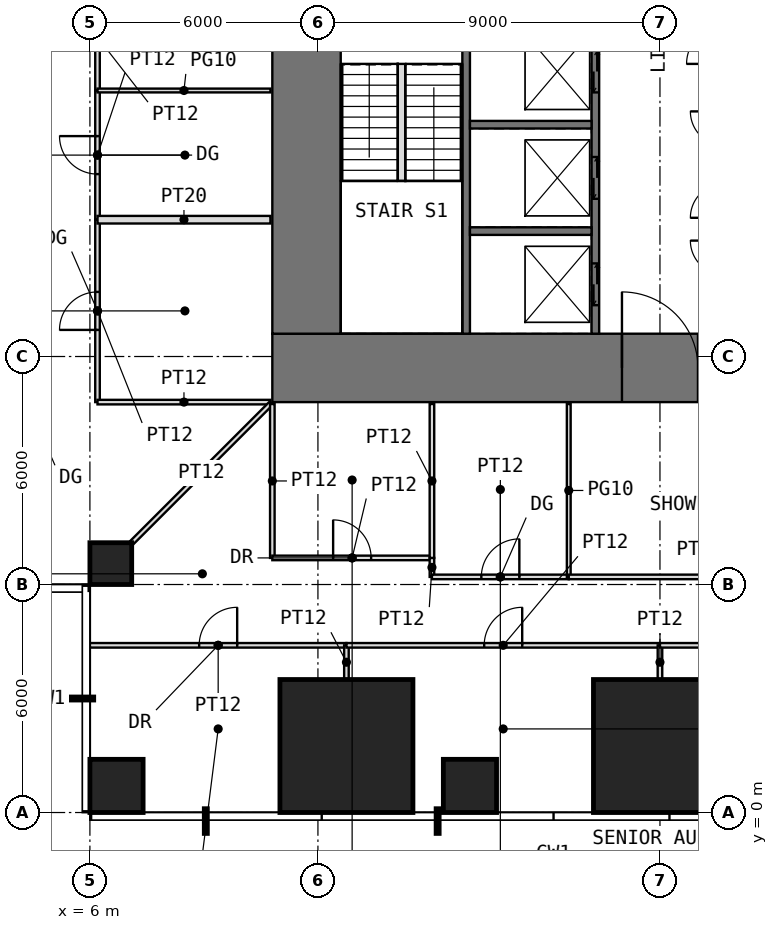
"""IFC4 building model, lengths in metres.
Left out: names, types, materials, properties, quantities, classifications, styles, units other than length and angle.
Written with IfcOpenShell. Run it as: python <this file> out.ifc"""

import sys

from ifc_helpers import new_model, si_unit, direction, frame, frame_2d, origin, origin_2d, place, context, subcontext, project, spatial, rectangle, extrude, element, fill, save


model = new_model("IFC4")
c1 = context("Model", 3, precision=1e-05, world=origin(), true_north=direction((0.0, 1.0)))
c2 = subcontext(c1, "Body", "Model", "MODEL_VIEW")
j1 = project(units=[si_unit("LENGTHUNIT", "METRE"), si_unit("PLANEANGLEUNIT", "RADIAN")], contexts=[c1])
p1 = place(None, origin())
s1 = spatial("IfcSite", under=j1, at=p1, CompositionType="ELEMENT")
p2 = place(p1, origin())
s2 = spatial("IfcBuilding", under=s1, at=p2, CompositionType="ELEMENT")
p3 = place(p2, frame((0.0, 0.0, 82.5)))
s3 = spatial("IfcBuildingStorey", under=s2, at=p3, CompositionType="ELEMENT", Elevation=82.5)
p4 = place(p3, frame((6.7, 0.7, 0.0), z_axis=(0.0, 0.0, 1.0), x_axis=(1.0, 0.0, 0.0)))
e1 = element("IfcColumn", 1, at=p4, inside=s3, PredefinedType="COLUMN", context=c2, shape_type="SweptSolid", body=[
    extrude(rectangle(XDim=1.4, YDim=1.4, at=origin_2d()), origin(), (0.0, 0.0, 1.0), 4.0),
])
p5 = place(p3, frame((12.75, 1.75, 0.0), z_axis=(0.0, 0.0, 1.0), x_axis=(1.0, 0.0, 0.0)))
e2 = element("IfcColumn", 2, at=p5, inside=s3, PredefinedType="COLUMN", context=c2, shape_type="SweptSolid", body=[
    extrude(rectangle(XDim=3.5, YDim=3.5, at=origin_2d()), origin(), (0.0, 0.0, 1.0), 4.0),
])
p6 = place(p3, frame((16.0, 0.7, 0.0), z_axis=(0.0, 0.0, 1.0), x_axis=(1.0, 0.0, 0.0)))
e3 = element("IfcColumn", 3, at=p6, inside=s3, PredefinedType="COLUMN", context=c2, shape_type="SweptSolid", body=[
    extrude(rectangle(XDim=1.4, YDim=1.4, at=origin_2d()), origin(), (0.0, 0.0, 1.0), 4.0),
])
p7 = place(p3, frame((21.0, 1.75, 0.0), z_axis=(0.0, 0.0, 1.0), x_axis=(1.0, 0.0, 0.0)))
e4 = element("IfcColumn", 4, at=p7, inside=s3, PredefinedType="COLUMN", context=c2, shape_type="SweptSolid", body=[
    extrude(rectangle(XDim=3.5, YDim=3.5, at=origin_2d()), origin(), (0.0, 0.0, 1.0), 4.0),
])
p8 = place(p3, frame((6.55, 6.55, 0.0), z_axis=(0.0, 0.0, 1.0), x_axis=(1.0, 0.0, 0.0)))
e5 = element("IfcColumn", 5, at=p8, inside=s3, PredefinedType="COLUMN", context=c2, shape_type="SweptSolid", body=[
    extrude(rectangle(XDim=1.1, YDim=1.1, at=origin_2d()), origin(), (0.0, 0.0, 1.0), 4.0),
])
p9 = place(p3, frame((10.8, 11.7, -0.05), z_axis=(0.0, 0.0, 1.0), x_axis=(1.0, 0.0, 0.0)))
e6 = element("IfcWall", 6, at=p9, inside=s3, PredefinedType="SHEAR", context=c2, shape_type="SweptSolid", body=[
    extrude(rectangle(XDim=20.4, YDim=1.8, at=frame_2d((10.2, 0.0))), origin(), (0.0, 0.0, 1.0), 3.8),
])
p10 = place(p9, frame((9.2, 0.0, 0.05)))
e7 = element("IfcOpeningElement", 7, at=p10, cuts=e6, PredefinedType="OPENING", context=c2, shape_type="SweptSolid", body=[
    extrude(rectangle(XDim=2.0, YDim=2.2, at=frame_2d((1.0, 1.1))), frame((0.0, 0.91, 0.0), z_axis=(0.0, -1.0, 0.0), x_axis=(1.0, 0.0, 0.0)), (0.0, 0.0, 1.0), 1.82),
])
p11 = place(p3, frame((11.7, 12.6, -0.05), z_axis=(0.0, 0.0, 1.0), x_axis=(0.0, 1.0, 0.0)))
e8 = element("IfcWall", 8, at=p11, inside=s3, PredefinedType="SHEAR", context=c2, shape_type="SweptSolid", body=[
    extrude(rectangle(XDim=16.8, YDim=1.8, at=frame_2d((8.4, 0.0))), origin(), (0.0, 0.0, 1.0), 3.8),
])
p12 = place(p11, frame((9.9, 0.0, 0.05)))
e9 = element("IfcOpeningElement", 9, at=p12, cuts=e8, PredefinedType="OPENING", context=c2, shape_type="SweptSolid", body=[
    extrude(rectangle(XDim=1.0, YDim=2.2, at=frame_2d((0.5, 1.1))), frame((0.0, 0.91, 0.0), z_axis=(0.0, -1.0, 0.0), x_axis=(1.0, 0.0, 0.0)), (0.0, 0.0, 1.0), 1.82),
])
p13 = place(p3, frame((15.9, 12.6, -0.05), z_axis=(0.0, 0.0, 1.0), x_axis=(0.0, 1.0, 0.0)))
e10 = element("IfcWall", 10, at=p13, inside=s3, PredefinedType="SHEAR", context=c2, shape_type="SweptSolid", body=[
    extrude(rectangle(XDim=16.8, YDim=0.2, at=frame_2d((8.4, 0.0))), origin(), (0.0, 0.0, 1.0), 3.8),
])
p14 = place(p13, frame((8.9, 0.0, 0.05)))
e11 = element("IfcOpeningElement", 11, at=p14, cuts=e10, PredefinedType="OPENING", context=c2, shape_type="SweptSolid", body=[
    extrude(rectangle(XDim=1.0, YDim=2.2, at=frame_2d((0.5, 1.1))), frame((0.0, 0.11, 0.0), z_axis=(0.0, -1.0, 0.0), x_axis=(1.0, 0.0, 0.0)), (0.0, 0.0, 1.0), 0.22),
])
p15 = place(p3, frame((19.3, 12.6, -0.05), z_axis=(0.0, 0.0, 1.0), x_axis=(0.0, 1.0, 0.0)))
e12 = element("IfcWall", 12, at=p15, inside=s3, PredefinedType="SHEAR", context=c2, shape_type="SweptSolid", body=[
    extrude(rectangle(XDim=16.8, YDim=0.2, at=frame_2d((8.4, 0.0))), origin(), (0.0, 0.0, 1.0), 3.8),
])
p16 = place(p15, frame((8.7, 0.0, 0.05)))
e13 = element("IfcOpeningElement", 13, at=p16, cuts=e12, PredefinedType="OPENING", context=c2, shape_type="SweptSolid", body=[
    extrude(rectangle(XDim=1.0, YDim=2.2, at=frame_2d((0.5, 1.1))), frame((0.0, 0.11, 0.0), z_axis=(0.0, -1.0, 0.0), x_axis=(1.0, 0.0, 0.0)), (0.0, 0.0, 1.0), 0.22),
])
p17 = place(p15, frame((10.85, 0.0, 0.05)))
e14 = element("IfcOpeningElement", 14, at=p17, cuts=e12, PredefinedType="OPENING", context=c2, shape_type="SweptSolid", body=[
    extrude(rectangle(XDim=0.9, YDim=2.2, at=frame_2d((0.45, 1.1))), frame((0.0, 0.11, 0.0), z_axis=(0.0, -1.0, 0.0), x_axis=(1.0, 0.0, 0.0)), (0.0, 0.0, 1.0), 0.22),
])
p18 = place(p15, frame((13.3, 0.0, 0.05)))
e15 = element("IfcOpeningElement", 15, at=p18, cuts=e12, PredefinedType="OPENING", context=c2, shape_type="SweptSolid", body=[
    extrude(rectangle(XDim=1.0, YDim=2.2, at=frame_2d((0.5, 1.1))), frame((0.0, 0.11, 0.0), z_axis=(0.0, -1.0, 0.0), x_axis=(1.0, 0.0, 0.0)), (0.0, 0.0, 1.0), 0.22),
])
p19 = place(p15, frame((15.55, 0.0, 0.05)))
e16 = element("IfcOpeningElement", 16, at=p19, cuts=e12, PredefinedType="OPENING", context=c2, shape_type="SweptSolid", body=[
    extrude(rectangle(XDim=0.9, YDim=2.2, at=frame_2d((0.45, 1.1))), frame((0.0, 0.11, 0.0), z_axis=(0.0, -1.0, 0.0), x_axis=(1.0, 0.0, 0.0)), (0.0, 0.0, 1.0), 0.22),
])
p20 = place(p15, frame((0.75, 0.0, 0.05)))
e17 = element("IfcOpeningElement", 17, at=p20, cuts=e12, PredefinedType="OPENING", context=c2, shape_type="SweptSolid", body=[
    extrude(rectangle(XDim=1.1, YDim=2.2, at=frame_2d((0.55, 1.1))), frame((0.0, 0.11, 0.0), z_axis=(0.0, -1.0, 0.0), x_axis=(1.0, 0.0, 0.0)), (0.0, 0.0, 1.0), 0.22),
])
p21 = place(p15, frame((3.55, 0.0, 0.05)))
e18 = element("IfcOpeningElement", 18, at=p21, cuts=e12, PredefinedType="OPENING", context=c2, shape_type="SweptSolid", body=[
    extrude(rectangle(XDim=1.1, YDim=2.2, at=frame_2d((0.55, 1.1))), frame((0.0, 0.11, 0.0), z_axis=(0.0, -1.0, 0.0), x_axis=(1.0, 0.0, 0.0)), (0.0, 0.0, 1.0), 0.22),
])
p22 = place(p15, frame((6.35, 0.0, 0.05)))
e19 = element("IfcOpeningElement", 19, at=p22, cuts=e12, PredefinedType="OPENING", context=c2, shape_type="SweptSolid", body=[
    extrude(rectangle(XDim=1.1, YDim=2.2, at=frame_2d((0.55, 1.1))), frame((0.0, 0.11, 0.0), z_axis=(0.0, -1.0, 0.0), x_axis=(1.0, 0.0, 0.0)), (0.0, 0.0, 1.0), 0.22),
])
for number, where, z_axis, x_axis in (
    (20, (16.0, 15.3, -0.05), (0.0, 0.0, 1.0), (1.0, 0.0, 0.0)),
    (21, (16.0, 18.1, -0.05), (0.0, 0.0, 1.0), (1.0, 0.0, 0.0)),
):
    element("IfcWall", number, at=place(p3, frame(where, z_axis=z_axis, x_axis=x_axis)), inside=s3, PredefinedType="SHEAR", context=c2, shape_type="SweptSolid", body=[
        extrude(rectangle(XDim=3.2, YDim=0.2, at=frame_2d((1.6, 0.0))), origin(), (0.0, 0.0, 1.0), 3.8),
    ])
p23 = place(p3, frame((6.0, 4.4, 0.0), z_axis=(0.0, 0.0, 1.0), x_axis=(1.0, 0.0, 0.0)))
e22 = element("IfcWall", 22, at=p23, inside=s3, PredefinedType="PARTITIONING", context=c2, shape_type="SweptSolid", body=[
    extrude(rectangle(XDim=6.75, YDim=0.12, at=frame_2d((3.375, 0.0))), origin(), (0.0, 0.0, 1.0), 3.55),
])
p24 = place(p23, frame((2.875, 0.0, 0.0)))
e23 = element("IfcOpeningElement", 23, at=p24, cuts=e22, PredefinedType="OPENING", context=c2, shape_type="SweptSolid", body=[
    extrude(rectangle(XDim=1.0, YDim=2.2, at=frame_2d((0.5, 1.1))), frame((0.0, 0.07, 0.0), z_axis=(0.0, -1.0, 0.0), x_axis=(1.0, 0.0, 0.0)), (0.0, 0.0, 1.0), 0.14),
])
p25 = place(p3, frame((6.2, 10.8, 0.0), z_axis=(0.0, 0.0, 1.0), x_axis=(0.0, 1.0, 0.0)))
e24 = element("IfcWall", 24, at=p25, inside=s3, PredefinedType="PARTITIONING", context=c2, shape_type="SweptSolid", body=[
    extrude(rectangle(XDim=4.8, YDim=0.12, at=frame_2d((2.4, 0.0))), origin(), (0.0, 0.0, 1.0), 3.55),
])
p26 = place(p25, frame((1.9, 0.0, 0.0)))
e25 = element("IfcOpeningElement", 25, at=p26, cuts=e24, PredefinedType="OPENING", context=c2, shape_type="SweptSolid", body=[
    extrude(rectangle(XDim=1.0, YDim=2.4, at=frame_2d((0.5, 1.2))), frame((0.0, 0.07, 0.0), z_axis=(0.0, -1.0, 0.0), x_axis=(1.0, 0.0, 0.0)), (0.0, 0.0, 1.0), 0.14),
])
p27 = place(p3, frame((6.2, 10.8, 0.0), z_axis=(0.0, 0.0, 1.0), x_axis=(1.0, 0.0, 0.0)))
e26 = element("IfcWall", 26, at=p27, inside=s3, PredefinedType="PARTITIONING", context=c2, shape_type="SweptSolid", body=[
    extrude(rectangle(XDim=4.55, YDim=0.12, at=frame_2d((2.275, 0.0))), origin(), (0.0, 0.0, 1.0), 3.55),
])
p28 = place(p3, frame((6.2, 15.6, 0.0), z_axis=(0.0, 0.0, 1.0), x_axis=(0.0, 1.0, 0.0)))
e27 = element("IfcWall", 27, at=p28, inside=s3, PredefinedType="PARTITIONING", context=c2, shape_type="SweptSolid", body=[
    extrude(rectangle(XDim=3.4, YDim=0.12, at=frame_2d((1.7, 0.0))), origin(), (0.0, 0.0, 1.0), 3.55),
])
p29 = place(p28, frame((1.2, 0.0, 0.0)))
e28 = element("IfcOpeningElement", 28, at=p29, cuts=e27, PredefinedType="OPENING", context=c2, shape_type="SweptSolid", body=[
    extrude(rectangle(XDim=1.0, YDim=2.4, at=frame_2d((0.5, 1.2))), frame((0.0, 0.07, 0.0), z_axis=(0.0, -1.0, 0.0), x_axis=(1.0, 0.0, 0.0)), (0.0, 0.0, 1.0), 0.14),
])
p30 = place(p3, frame((6.2, 15.6, 0.0), z_axis=(0.0, 0.0, 1.0), x_axis=(1.0, 0.0, 0.0)))
e29 = element("IfcWall", 29, at=p30, inside=s3, PredefinedType="PARTITIONING", context=c2, shape_type="SweptSolid", body=[
    extrude(rectangle(XDim=4.55, YDim=0.2, at=frame_2d((2.275, 0.0))), origin(), (0.0, 0.0, 1.0), 3.55),
])
p31 = place(p3, frame((6.2, 19.0, 0.0), z_axis=(0.0, 0.0, 1.0), x_axis=(0.0, 1.0, 0.0)))
e30 = element("IfcWall", 30, at=p31, inside=s3, PredefinedType="PARTITIONING", context=c2, shape_type="SweptSolid", body=[
    extrude(rectangle(XDim=2.8, YDim=0.12, at=frame_2d((1.4, 0.0))), origin(), (0.0, 0.0, 1.0), 3.55),
])
p32 = place(p3, frame((6.2, 19.0, 0.0), z_axis=(0.0, 0.0, 1.0), x_axis=(1.0, 0.0, 0.0)))
e31 = element("IfcWall", 31, at=p32, inside=s3, PredefinedType="PARTITIONING", context=c2, shape_type="SweptSolid", body=[
    extrude(rectangle(XDim=4.55, YDim=0.1, at=frame_2d((2.275, 0.0))), origin(), (0.0, 0.0, 1.0), 3.55),
])
p33 = place(p3, frame((7.11, 7.11, 0.0), z_axis=(0.0, 0.0, 1.0), x_axis=(0.707106781187, 0.707106781187, 0.0)))
e32 = element("IfcWall", 32, at=p33, inside=s3, PredefinedType="PARTITIONING", context=c2, shape_type="SweptSolid", body=[
    extrude(rectangle(XDim=5.168, YDim=0.12, at=frame_2d((2.584, 0.0))), origin(), (0.0, 0.0, 1.0), 3.55),
])
p34 = place(p3, frame((10.8, 6.7, 0.0), z_axis=(0.0, 0.0, 1.0), x_axis=(0.0, 1.0, 0.0)))
e33 = element("IfcWall", 33, at=p34, inside=s3, PredefinedType="PARTITIONING", context=c2, shape_type="SweptSolid", body=[
    extrude(rectangle(XDim=4.05, YDim=0.12, at=frame_2d((2.025, 0.0))), origin(), (0.0, 0.0, 1.0), 3.55),
])
p35 = place(p3, frame((10.8, 6.7, 0.0), z_axis=(0.0, 0.0, 1.0), x_axis=(1.0, 0.0, 0.0)))
e34 = element("IfcWall", 34, at=p35, inside=s3, PredefinedType="PARTITIONING", context=c2, shape_type="SweptSolid", body=[
    extrude(rectangle(XDim=4.2, YDim=0.12, at=frame_2d((2.1, 0.0))), origin(), (0.0, 0.0, 1.0), 3.55),
])
p36 = place(p35, frame((1.6, 0.0, 0.0)))
e35 = element("IfcOpeningElement", 35, at=p36, cuts=e34, PredefinedType="OPENING", context=c2, shape_type="SweptSolid", body=[
    extrude(rectangle(XDim=1.0, YDim=2.2, at=frame_2d((0.5, 1.1))), frame((0.0, 0.07, 0.0), z_axis=(0.0, -1.0, 0.0), x_axis=(1.0, 0.0, 0.0)), (0.0, 0.0, 1.0), 0.14),
])
p37 = place(p3, frame((12.75, 3.51, 0.0), z_axis=(0.0, 0.0, 1.0), x_axis=(0.0, 1.0, 0.0)))
e36 = element("IfcWall", 36, at=p37, inside=s3, PredefinedType="PARTITIONING", context=c2, shape_type="SweptSolid", body=[
    extrude(rectangle(XDim=0.89, YDim=0.12, at=frame_2d((0.445, 0.0))), origin(), (0.0, 0.0, 1.0), 3.55),
])
p38 = place(p3, frame((12.75, 4.4, 0.0), z_axis=(0.0, 0.0, 1.0), x_axis=(1.0, 0.0, 0.0)))
e37 = element("IfcWall", 37, at=p38, inside=s3, PredefinedType="PARTITIONING", context=c2, shape_type="SweptSolid", body=[
    extrude(rectangle(XDim=8.25, YDim=0.12, at=frame_2d((4.125, 0.0))), origin(), (0.0, 0.0, 1.0), 3.55),
])
p39 = place(p38, frame((3.625, 0.0, 0.0)))
e38 = element("IfcOpeningElement", 38, at=p39, cuts=e37, PredefinedType="OPENING", context=c2, shape_type="SweptSolid", body=[
    extrude(rectangle(XDim=1.0, YDim=2.4, at=frame_2d((0.5, 1.2))), frame((0.0, 0.07, 0.0), z_axis=(0.0, -1.0, 0.0), x_axis=(1.0, 0.0, 0.0)), (0.0, 0.0, 1.0), 0.14),
])
p40 = place(p3, frame((15.0, 6.2, 0.0), z_axis=(0.0, 0.0, 1.0), x_axis=(0.0, 1.0, 0.0)))
e39 = element("IfcWall", 39, at=p40, inside=s3, PredefinedType="PARTITIONING", context=c2, shape_type="SweptSolid", body=[
    extrude(rectangle(XDim=0.5, YDim=0.12, at=frame_2d((0.25, 0.0))), origin(), (0.0, 0.0, 1.0), 3.55),
])
p41 = place(p3, frame((15.0, 6.2, 0.0), z_axis=(0.0, 0.0, 1.0), x_axis=(1.0, 0.0, 0.0)))
e40 = element("IfcWall", 40, at=p41, inside=s3, PredefinedType="PARTITIONING", context=c2, shape_type="SweptSolid", body=[
    extrude(rectangle(XDim=3.6, YDim=0.12, at=frame_2d((1.8, 0.0))), origin(), (0.0, 0.0, 1.0), 3.55),
])
p42 = place(p41, frame((1.3, 0.0, 0.0)))
e41 = element("IfcOpeningElement", 41, at=p42, cuts=e40, PredefinedType="OPENING", context=c2, shape_type="SweptSolid", body=[
    extrude(rectangle(XDim=1.0, YDim=2.4, at=frame_2d((0.5, 1.2))), frame((0.0, 0.07, 0.0), z_axis=(0.0, -1.0, 0.0), x_axis=(1.0, 0.0, 0.0)), (0.0, 0.0, 1.0), 0.14),
])
p43 = place(p3, frame((15.0, 6.7, 0.0), z_axis=(0.0, 0.0, 1.0), x_axis=(0.0, 1.0, 0.0)))
e42 = element("IfcWall", 42, at=p43, inside=s3, PredefinedType="PARTITIONING", context=c2, shape_type="SweptSolid", body=[
    extrude(rectangle(XDim=4.05, YDim=0.12, at=frame_2d((2.025, 0.0))), origin(), (0.0, 0.0, 1.0), 3.55),
])
p44 = place(p3, frame((18.6, 6.2, 0.0), z_axis=(0.0, 0.0, 1.0), x_axis=(0.0, 1.0, 0.0)))
e43 = element("IfcWall", 43, at=p44, inside=s3, PredefinedType="PARTITIONING", context=c2, shape_type="SweptSolid", body=[
    extrude(rectangle(XDim=4.55, YDim=0.1, at=frame_2d((2.275, 0.0))), origin(), (0.0, 0.0, 1.0), 3.55),
])
p45 = place(p3, frame((18.6, 6.2, 0.0), z_axis=(0.0, 0.0, 1.0), x_axis=(1.0, 0.0, 0.0)))
e44 = element("IfcWall", 44, at=p45, inside=s3, PredefinedType="PARTITIONING", context=c2, shape_type="SweptSolid", body=[
    extrude(rectangle(XDim=12.6, YDim=0.12, at=frame_2d((6.3, 0.0))), origin(), (0.0, 0.0, 1.0), 3.55),
])
p46 = place(p45, frame((8.1, 0.0, 0.0)))
e45 = element("IfcOpeningElement", 45, at=p46, cuts=e44, PredefinedType="OPENING", context=c2, shape_type="SweptSolid", body=[
    extrude(rectangle(XDim=1.0, YDim=2.4, at=frame_2d((0.5, 1.2))), frame((0.0, 0.07, 0.0), z_axis=(0.0, -1.0, 0.0), x_axis=(1.0, 0.0, 0.0)), (0.0, 0.0, 1.0), 0.14),
])
p47 = place(p3, frame((21.0, 3.51, 0.0), z_axis=(0.0, 0.0, 1.0), x_axis=(0.0, 1.0, 0.0)))
e46 = element("IfcWall", 46, at=p47, inside=s3, PredefinedType="PARTITIONING", context=c2, shape_type="SweptSolid", body=[
    extrude(rectangle(XDim=0.89, YDim=0.12, at=frame_2d((0.445, 0.0))), origin(), (0.0, 0.0, 1.0), 3.55),
])
p48 = place(p3, frame((21.0, 4.4, 0.0), z_axis=(0.0, 0.0, 1.0), x_axis=(1.0, 0.0, 0.0)))
e47 = element("IfcWall", 47, at=p48, inside=s3, PredefinedType="PARTITIONING", context=c2, shape_type="SweptSolid", body=[
    extrude(rectangle(XDim=5.0, YDim=0.12, at=frame_2d((2.5, 0.0))), origin(), (0.0, 0.0, 1.0), 3.55),
])
p49 = place(p48, frame((2.0, 0.0, 0.0)))
e48 = element("IfcOpeningElement", 48, at=p49, cuts=e47, PredefinedType="OPENING", context=c2, shape_type="SweptSolid", body=[
    extrude(rectangle(XDim=1.0, YDim=2.2, at=frame_2d((0.5, 1.1))), frame((0.0, 0.07, 0.0), z_axis=(0.0, -1.0, 0.0), x_axis=(1.0, 0.0, 0.0)), (0.0, 0.0, 1.0), 0.14),
])
p50 = place(p3, frame((14.2, 16.62, 0.0), z_axis=(0.0, 0.0, 1.0), x_axis=(0.0, 1.0, 0.0)))
e49 = element("IfcWall", 49, at=p50, inside=s3, PredefinedType="PARTITIONING", context=c2, shape_type="SweptSolid", body=[
    extrude(rectangle(XDim=3.08, YDim=0.2, at=frame_2d((1.54, 0.0))), origin(), (0.0, 0.0, 1.0), 4.0),
])
p51 = place(p10, origin())
e50 = element("IfcDoor", 50, at=p51, inside=s3, OperationType="DOUBLE_DOOR_SINGLE_SWING", PredefinedType="DOOR", context=c2, shape_type="SweptSolid", body=[
    extrude(rectangle(XDim=2.0, YDim=2.2, at=frame_2d((1.0, 1.1))), frame((0.0, 0.025, 0.0), z_axis=(0.0, -1.0, 0.0), x_axis=(1.0, 0.0, 0.0)), (0.0, 0.0, 1.0), 0.05),
])
fill(e7, e50)
p52 = place(p36, origin())
e51 = element("IfcDoor", 51, at=p52, inside=s3, OperationType="SINGLE_SWING_LEFT", PredefinedType="DOOR", context=c2, shape_type="SweptSolid", body=[
    extrude(rectangle(XDim=1.0, YDim=2.2, at=frame_2d((0.5, 1.1))), frame((0.0, 0.025, 0.0), z_axis=(0.0, -1.0, 0.0), x_axis=(1.0, 0.0, 0.0)), (0.0, 0.0, 1.0), 0.05),
])
fill(e35, e51)
p53 = place(p42, origin())
e52 = element("IfcDoor", 52, at=p53, inside=s3, OperationType="SINGLE_SWING_RIGHT", PredefinedType="DOOR", context=c2, shape_type="SweptSolid", body=[
    extrude(rectangle(XDim=1.0, YDim=2.4, at=frame_2d((0.5, 1.2))), frame((0.0, 0.025, 0.0), z_axis=(0.0, -1.0, 0.0), x_axis=(1.0, 0.0, 0.0)), (0.0, 0.0, 1.0), 0.05),
])
fill(e41, e52)
p54 = place(p24, origin())
e53 = element("IfcDoor", 53, at=p54, inside=s3, OperationType="SINGLE_SWING_RIGHT", PredefinedType="DOOR", context=c2, shape_type="SweptSolid", body=[
    extrude(rectangle(XDim=1.0, YDim=2.2, at=frame_2d((0.5, 1.1))), frame((0.0, 0.025, 0.0), z_axis=(0.0, -1.0, 0.0), x_axis=(1.0, 0.0, 0.0)), (0.0, 0.0, 1.0), 0.05),
])
fill(e23, e53)
p55 = place(p26, origin())
e54 = element("IfcDoor", 54, at=p55, inside=s3, OperationType="SINGLE_SWING_LEFT", PredefinedType="DOOR", context=c2, shape_type="SweptSolid", body=[
    extrude(rectangle(XDim=1.0, YDim=2.4, at=frame_2d((0.5, 1.2))), frame((0.0, 0.025, 0.0), z_axis=(0.0, -1.0, 0.0), x_axis=(1.0, 0.0, 0.0)), (0.0, 0.0, 1.0), 0.05),
])
fill(e25, e54)
p56 = place(p29, origin())
e55 = element("IfcDoor", 55, at=p56, inside=s3, OperationType="SINGLE_SWING_RIGHT", PredefinedType="DOOR", context=c2, shape_type="SweptSolid", body=[
    extrude(rectangle(XDim=1.0, YDim=2.4, at=frame_2d((0.5, 1.2))), frame((0.0, 0.025, 0.0), z_axis=(0.0, -1.0, 0.0), x_axis=(1.0, 0.0, 0.0)), (0.0, 0.0, 1.0), 0.05),
])
fill(e28, e55)
p57 = place(p39, origin())
e56 = element("IfcDoor", 56, at=p57, inside=s3, OperationType="SINGLE_SWING_RIGHT", PredefinedType="DOOR", context=c2, shape_type="SweptSolid", body=[
    extrude(rectangle(XDim=1.0, YDim=2.4, at=frame_2d((0.5, 1.2))), frame((0.0, 0.025, 0.0), z_axis=(0.0, -1.0, 0.0), x_axis=(1.0, 0.0, 0.0)), (0.0, 0.0, 1.0), 0.05),
])
fill(e38, e56)
p58 = place(p20, origin())
e57 = element("IfcDoor", 57, at=p58, inside=s3, OperationType="DOUBLE_DOOR_SLIDING", PredefinedType="DOOR", context=c2, shape_type="SweptSolid", body=[
    extrude(rectangle(XDim=1.1, YDim=2.2, at=frame_2d((0.55, 1.1))), frame((0.0, 0.025, 0.0), z_axis=(0.0, -1.0, 0.0), x_axis=(1.0, 0.0, 0.0)), (0.0, 0.0, 1.0), 0.05),
])
fill(e17, e57)
p59 = place(p21, origin())
e58 = element("IfcDoor", 58, at=p59, inside=s3, OperationType="DOUBLE_DOOR_SLIDING", PredefinedType="DOOR", context=c2, shape_type="SweptSolid", body=[
    extrude(rectangle(XDim=1.1, YDim=2.2, at=frame_2d((0.55, 1.1))), frame((0.0, 0.025, 0.0), z_axis=(0.0, -1.0, 0.0), x_axis=(1.0, 0.0, 0.0)), (0.0, 0.0, 1.0), 0.05),
])
fill(e18, e58)
p60 = place(p22, origin())
e59 = element("IfcDoor", 59, at=p60, inside=s3, OperationType="DOUBLE_DOOR_SLIDING", PredefinedType="DOOR", context=c2, shape_type="SweptSolid", body=[
    extrude(rectangle(XDim=1.1, YDim=2.2, at=frame_2d((0.55, 1.1))), frame((0.0, 0.025, 0.0), z_axis=(0.0, -1.0, 0.0), x_axis=(1.0, 0.0, 0.0)), (0.0, 0.0, 1.0), 0.05),
])
fill(e19, e59)
save(model, sys.argv[1])
